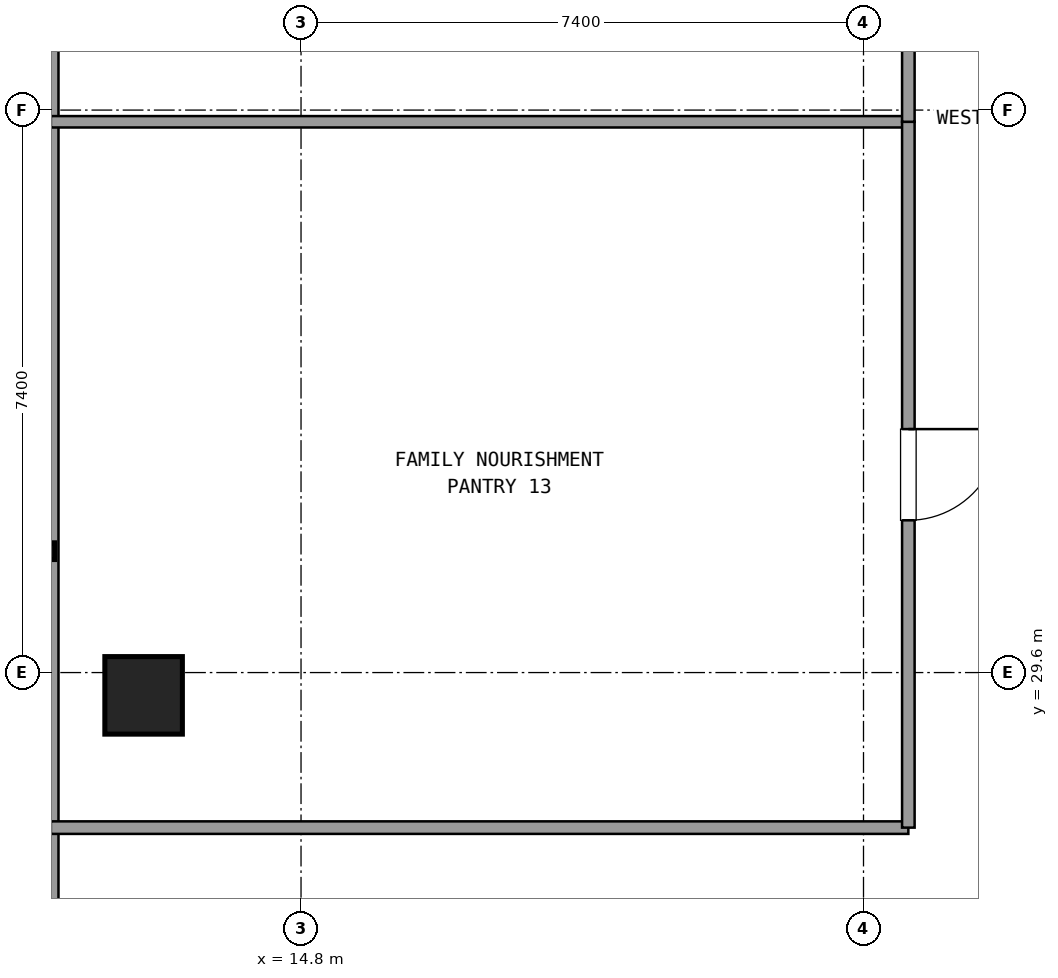
"""IFC4 building model, lengths in metres.
Left out: names, types, materials, properties, quantities, classifications, styles, units other than length and angle.
Written with IfcOpenShell. Run it as: python <this file> out.ifc"""

import sys

from ifc_helpers import new_model, si_unit, direction, frame, frame_2d, origin, origin_2d, place, context, subcontext, project, spatial, rectangle, extrude, element, fill, save


model = new_model("IFC4")
c1 = context("Model", 3, precision=1e-05, world=origin(), true_north=direction((0.0, 1.0)))
c2 = subcontext(c1, "Body", "Model", "MODEL_VIEW")
j1 = project(units=[si_unit("LENGTHUNIT", "METRE"), si_unit("PLANEANGLEUNIT", "RADIAN")], contexts=[c1])
p1 = place(None, origin())
s1 = spatial("IfcSite", under=j1, at=p1, CompositionType="ELEMENT")
p2 = place(p1, origin())
s2 = spatial("IfcBuilding", under=s1, at=p2, CompositionType="ELEMENT")
p3 = place(p2, frame((0.0, 0.0, 102.78)))
s3 = spatial("IfcBuildingStorey", under=s2, at=p3, CompositionType="ELEMENT", Elevation=102.78)
p4 = place(p3, frame((12.729, 29.3, 0.021), z_axis=(0.084850379912, 0.0, 0.996393703828), x_axis=(0.0, 1.0, 0.0)))
e1 = element("IfcColumn", 1, at=p4, inside=s3, PredefinedType="COLUMN", context=c2, shape_type="SweptSolid", body=[
    extrude(rectangle(XDim=1.02, YDim=1.02, at=origin_2d()), origin(), (0.0, 0.0, 1.0), 3.571),
])
p5 = place(p3, frame((11.489, 41.791, 0.0), z_axis=(0.0, 0.0, 1.0), x_axis=(0.0, -1.0, 0.0)))
e2 = element("IfcWall", 2, at=p5, inside=s3, PredefinedType="SOLIDWALL", context=c2, shape_type="SweptSolid", body=[
    extrude(rectangle(XDim=31.782, YDim=0.24, at=frame_2d((15.891, 0.0))), origin(), (0.0, 0.0, 1.0), 0.85),
])
p6 = place(p3, frame((11.509, 27.56, 0.0), z_axis=(0.0, 0.0, 1.0), x_axis=(1.0, 0.0, 0.0)))
e3 = element("IfcWall", 3, at=p6, inside=s3, PredefinedType="PARTITIONING", context=c2, shape_type="SweptSolid", body=[
    extrude(rectangle(XDim=11.281, YDim=0.165, at=frame_2d((5.641, 0.0))), origin(), (0.0, 0.0, 1.0), 2.61),
])
p7 = place(p3, frame((22.79, 36.846, 0.0), z_axis=(0.0, 0.0, 1.0), x_axis=(-1.0, 0.0, 0.0)))
e4 = element("IfcWall", 4, at=p7, inside=s3, PredefinedType="PARTITIONING", context=c2, shape_type="SweptSolid", body=[
    extrude(rectangle(XDim=11.281, YDim=0.15, at=frame_2d((5.641, 0.0))), origin(), (0.0, 0.0, 1.0), 2.61),
])
p8 = place(p3, frame((22.79, 27.56, 0.0), z_axis=(0.0, 0.0, 1.0), x_axis=(0.0, 1.0, 0.0)))
e5 = element("IfcWall", 5, at=p8, inside=s3, PredefinedType="PARTITIONING", context=c2, shape_type="SweptSolid", body=[
    extrude(rectangle(XDim=9.286, YDim=0.165, at=frame_2d((4.643, 0.0))), origin(), (0.0, 0.0, 1.0), 2.61),
])
p9 = place(p8, frame((4.043, 0.0, 0.0)))
e6 = element("IfcOpeningElement", 6, at=p9, cuts=e5, PredefinedType="OPENING", context=c2, shape_type="SweptSolid", body=[
    extrude(rectangle(XDim=1.2, YDim=2.15, at=frame_2d((0.6, 1.075))), frame((0.0, 0.093, 0.0), z_axis=(0.0, -1.0, 0.0), x_axis=(1.0, 0.0, 0.0)), (0.0, 0.0, 1.0), 0.185),
])
p10 = place(p3, frame((22.79, 36.846, 0.0), z_axis=(0.0, 0.0, 1.0), x_axis=(0.0, 1.0, 0.0)))
e7 = element("IfcWall", 7, at=p10, inside=s3, PredefinedType="PARTITIONING", context=c2, shape_type="SweptSolid", body=[
    extrude(rectangle(XDim=10.9, YDim=0.165, at=frame_2d((5.45, 0.0))), origin(), (0.0, 0.0, 1.0), 2.61),
])
p11 = place(p10, frame((4.85, 0.0, 0.0)))
e8 = element("IfcOpeningElement", 8, at=p11, cuts=e7, PredefinedType="OPENING", context=c2, shape_type="SweptSolid", body=[
    extrude(rectangle(XDim=1.2, YDim=2.15, at=frame_2d((0.6, 1.075))), frame((0.0, 0.093, 0.0), z_axis=(0.0, -1.0, 0.0), x_axis=(1.0, 0.0, 0.0)), (0.0, 0.0, 1.0), 0.185),
])
p12 = place(p9, frame((1.2, 0.0, 0.0), z_axis=(0.0, 0.0, 1.0), x_axis=(-1.0, 0.0, 0.0)))
e9 = element("IfcDoor", 9, at=p12, inside=s3, OperationType="SINGLE_SWING_RIGHT", PredefinedType="DOOR", context=c2, shape_type="SweptSolid", body=[
    extrude(rectangle(XDim=1.2, YDim=2.15, at=frame_2d((0.6, 1.075))), frame((0.0, 0.025, 0.0), z_axis=(0.0, -1.0, 0.0), x_axis=(1.0, 0.0, 0.0)), (0.0, 0.0, 1.0), 0.05),
])
fill(e6, e9)
save(model, sys.argv[1])
